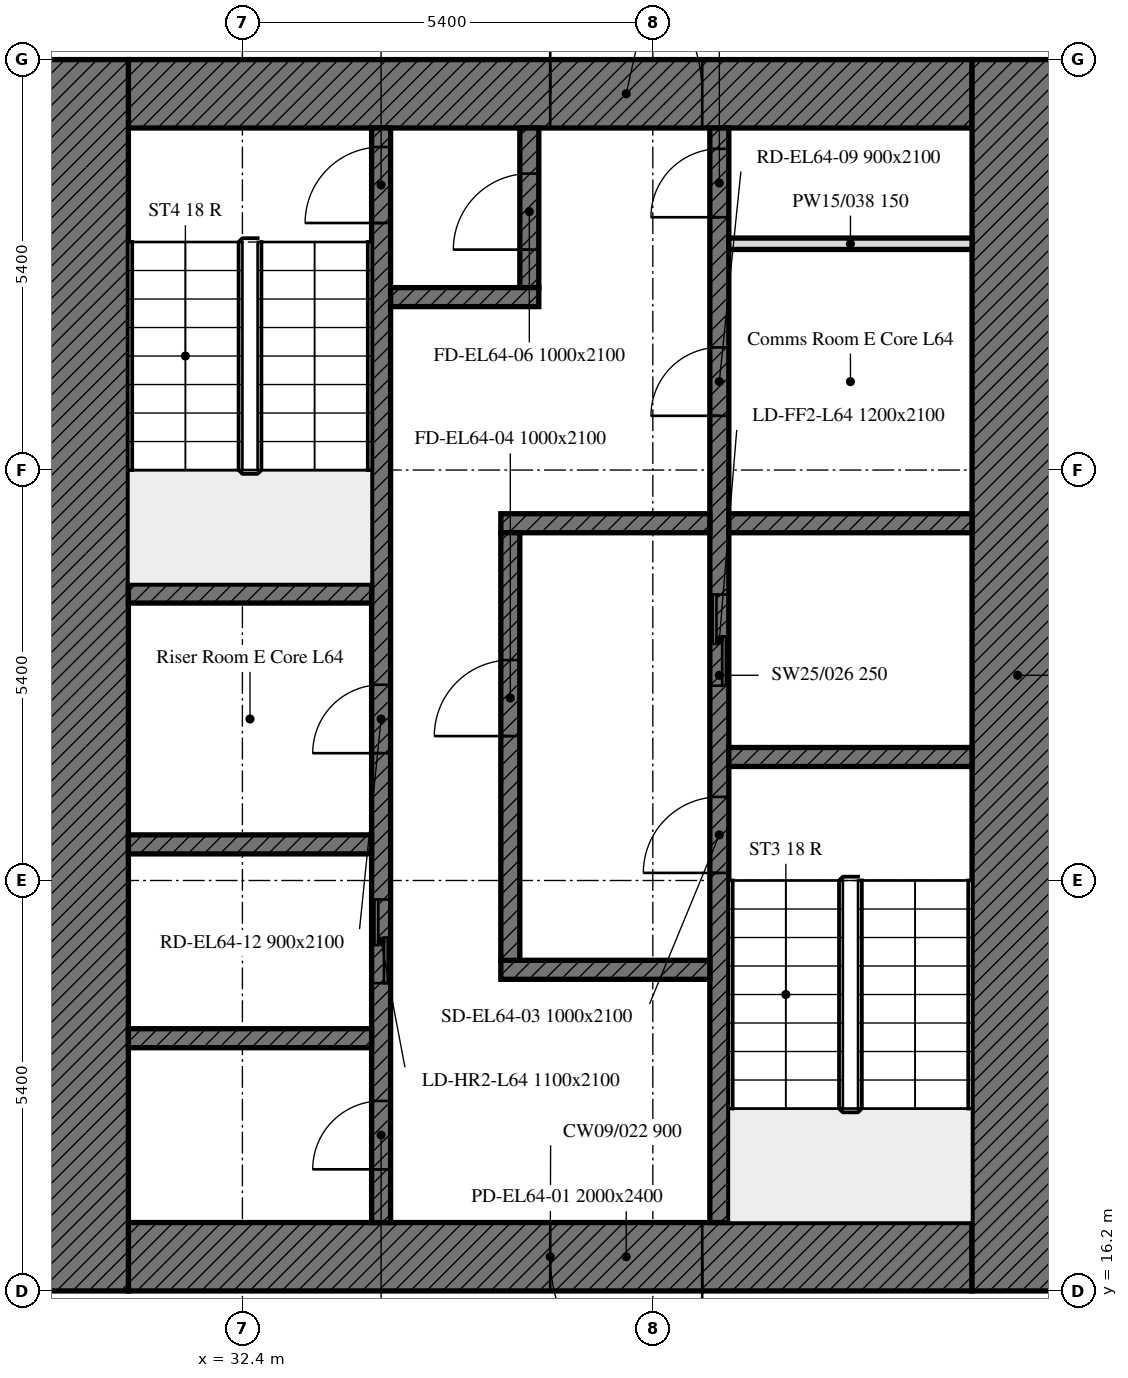
"""IFC4 building model, lengths in metres.
Left out: names, types, materials, properties, quantities, classifications, styles, units other than length and angle.
Written with IfcOpenShell. Run it as: python <this file> out.ifc"""

import sys

from ifc_helpers import new_model, si_unit, direction, frame, frame_2d, origin, place, context, subcontext, project, spatial, rectangle, extrude, element, fill, save


model = new_model("IFC4")
c1 = context("Model", 3, precision=1e-05, world=origin(), true_north=direction((0.0, 1.0)))
c2 = subcontext(c1, "Body", "Model", "MODEL_VIEW")
j1 = project(units=[si_unit("LENGTHUNIT", "METRE"), si_unit("PLANEANGLEUNIT", "RADIAN")], contexts=[c1])
p1 = place(None, origin())
s1 = spatial("IfcSite", under=j1, at=p1, CompositionType="ELEMENT")
p2 = place(p1, origin())
s2 = spatial("IfcBuilding", under=s1, at=p2, CompositionType="ELEMENT")
p3 = place(p2, frame((0.0, 0.0, 265.3)))
s3 = spatial("IfcBuildingStorey", under=s2, at=p3, CompositionType="ELEMENT", Elevation=265.3)
p4 = place(p3, frame((42.0, 16.65, 0.0), z_axis=(0.0, 0.0, 1.0), x_axis=(-1.0, 0.0, 0.0)))
e1 = element("IfcWall", 1, at=p4, inside=s3, PredefinedType="SOLIDWALL", context=c2, shape_type="SweptSolid", body=[
    extrude(rectangle(XDim=11.1, YDim=0.9, at=frame_2d((5.55, 0.0))), origin(), (0.0, 0.0, 1.0), 3.0),
])
p5 = place(p4, frame((3.55, 0.0, 0.0)))
e2 = element("IfcOpeningElement", 2, at=p5, cuts=e1, PredefinedType="OPENING", context=c2, shape_type="SweptSolid", body=[
    extrude(rectangle(XDim=2.0, YDim=2.4, at=frame_2d((1.0, 1.2))), frame((0.0, 0.45, 0.0), z_axis=(0.0, -1.0, 0.0), x_axis=(1.0, 0.0, 0.0)), (0.0, 0.0, 1.0), 0.9),
])
p6 = place(p3, frame((30.9, 31.95, 0.0), z_axis=(0.0, 0.0, 1.0), x_axis=(1.0, 0.0, 0.0)))
e3 = element("IfcWall", 3, at=p6, inside=s3, PredefinedType="SOLIDWALL", context=c2, shape_type="SweptSolid", body=[
    extrude(rectangle(XDim=11.1, YDim=0.9, at=frame_2d((5.55, 0.0))), origin(), (0.0, 0.0, 1.0), 3.0),
])
p7 = place(p6, frame((5.55, 0.0, 0.0)))
e4 = element("IfcOpeningElement", 4, at=p7, cuts=e3, PredefinedType="OPENING", context=c2, shape_type="SweptSolid", body=[
    extrude(rectangle(XDim=2.0, YDim=2.4, at=frame_2d((1.0, 1.2))), frame((0.0, 0.45, 0.0), z_axis=(0.0, -1.0, 0.0), x_axis=(1.0, 0.0, 0.0)), (0.0, 0.0, 1.0), 0.9),
])
for number, where, z_axis, x_axis in (
    (5, (42.6, 32.4, 0.0), (0.0, 0.0, 1.0), (0.0, -1.0, 0.0)),
    (6, (30.3, 16.2, 0.0), (0.0, 0.0, 1.0), (0.0, 1.0, 0.0)),
):
    element("IfcWall", number, at=place(p3, frame(where, z_axis=z_axis, x_axis=x_axis)), inside=s3, PredefinedType="SOLIDWALL", context=c2, shape_type="SweptSolid", body=[
        extrude(rectangle(XDim=16.2, YDim=1.2, at=frame_2d((8.1, 0.0))), origin(), (0.0, 0.0, 1.0), 3.0),
    ])
p8 = place(p3, frame((38.675, 17.1, 0.0), z_axis=(0.0, 0.0, 1.0), x_axis=(0.0, 1.0, 0.0)))
e7 = element("IfcWall", 7, at=p8, inside=s3, PredefinedType="SOLIDWALL", context=c2, shape_type="SweptSolid", body=[
    extrude(rectangle(XDim=14.4, YDim=0.25, at=frame_2d((7.2, 0.0))), origin(), (0.0, 0.0, 1.0), 3.0),
])
p9 = place(p8, frame((4.6, 0.0, 0.0)))
e8 = element("IfcOpeningElement", 8, at=p9, cuts=e7, PredefinedType="OPENING", context=c2, shape_type="SweptSolid", body=[
    extrude(rectangle(XDim=1.0, YDim=2.1, at=frame_2d((0.5, 1.05))), frame((0.0, 0.125, 0.0), z_axis=(0.0, -1.0, 0.0), x_axis=(1.0, 0.0, 0.0)), (0.0, 0.0, 1.0), 0.25),
])
p10 = place(p8, frame((7.062, 0.0, 0.0)))
e9 = element("IfcOpeningElement", 9, at=p10, cuts=e7, PredefinedType="OPENING", context=c2, shape_type="SweptSolid", body=[
    extrude(rectangle(XDim=1.2, YDim=2.1, at=frame_2d((0.6, 1.05))), frame((0.0, 0.125, 0.0), z_axis=(0.0, -1.0, 0.0), x_axis=(1.0, 0.0, 0.0)), (0.0, 0.0, 1.0), 0.25),
])
p11 = place(p8, frame((10.614, 0.0, 0.0)))
e10 = element("IfcOpeningElement", 10, at=p11, cuts=e7, PredefinedType="OPENING", context=c2, shape_type="SweptSolid", body=[
    extrude(rectangle(XDim=0.9, YDim=2.1, at=frame_2d((0.45, 1.05))), frame((0.0, 0.125, 0.0), z_axis=(0.0, -1.0, 0.0), x_axis=(1.0, 0.0, 0.0)), (0.0, 0.0, 1.0), 0.25),
])
p12 = place(p8, frame((13.226, 0.0, 0.0)))
e11 = element("IfcOpeningElement", 11, at=p12, cuts=e7, PredefinedType="OPENING", context=c2, shape_type="SweptSolid", body=[
    extrude(rectangle(XDim=0.9, YDim=2.1, at=frame_2d((0.45, 1.05))), frame((0.0, 0.125, 0.0), z_axis=(0.0, -1.0, 0.0), x_axis=(1.0, 0.0, 0.0)), (0.0, 0.0, 1.0), 0.25),
])
p13 = place(p3, frame((34.225, 17.1, 0.0), z_axis=(0.0, 0.0, 1.0), x_axis=(0.0, 1.0, 0.0)))
e12 = element("IfcWall", 12, at=p13, inside=s3, PredefinedType="SOLIDWALL", context=c2, shape_type="SweptSolid", body=[
    extrude(rectangle(XDim=14.4, YDim=0.25, at=frame_2d((7.2, 0.0))), origin(), (0.0, 0.0, 1.0), 3.0),
])
p14 = place(p13, frame((13.15, 0.0, 0.0)))
e13 = element("IfcOpeningElement", 13, at=p14, cuts=e12, PredefinedType="OPENING", context=c2, shape_type="SweptSolid", body=[
    extrude(rectangle(XDim=1.0, YDim=2.1, at=frame_2d((0.5, 1.05))), frame((0.0, 0.125, 0.0), z_axis=(0.0, -1.0, 0.0), x_axis=(1.0, 0.0, 0.0)), (0.0, 0.0, 1.0), 0.25),
])
p15 = place(p13, frame((3.15, 0.0, 0.0)))
e14 = element("IfcOpeningElement", 14, at=p15, cuts=e12, PredefinedType="OPENING", context=c2, shape_type="SweptSolid", body=[
    extrude(rectangle(XDim=1.1, YDim=2.1, at=frame_2d((0.55, 1.05))), frame((0.0, 0.125, 0.0), z_axis=(0.0, -1.0, 0.0), x_axis=(1.0, 0.0, 0.0)), (0.0, 0.0, 1.0), 0.25),
])
p16 = place(p13, frame((0.7, 0.0, 0.0)))
e15 = element("IfcOpeningElement", 15, at=p16, cuts=e12, PredefinedType="OPENING", context=c2, shape_type="SweptSolid", body=[
    extrude(rectangle(XDim=0.9, YDim=2.1, at=frame_2d((0.45, 1.05))), frame((0.0, 0.125, 0.0), z_axis=(0.0, -1.0, 0.0), x_axis=(1.0, 0.0, 0.0)), (0.0, 0.0, 1.0), 0.25),
])
p17 = place(p13, frame((6.175, 0.0, 0.0)))
e16 = element("IfcOpeningElement", 16, at=p17, cuts=e12, PredefinedType="OPENING", context=c2, shape_type="SweptSolid", body=[
    extrude(rectangle(XDim=0.9, YDim=2.1, at=frame_2d((0.45, 1.05))), frame((0.0, 0.125, 0.0), z_axis=(0.0, -1.0, 0.0), x_axis=(1.0, 0.0, 0.0)), (0.0, 0.0, 1.0), 0.25),
])
p18 = place(p3, frame((38.8, 23.225, 0.0), z_axis=(0.0, 0.0, 1.0), x_axis=(1.0, 0.0, 0.0)))
e17 = element("IfcWall", 17, at=p18, inside=s3, PredefinedType="SOLIDWALL", context=c2, shape_type="SweptSolid", body=[
    extrude(rectangle(XDim=3.2, YDim=0.25, at=frame_2d((1.6, 0.0))), origin(), (0.0, 0.0, 1.0), 3.0),
])
for number, where, z_axis, x_axis in (
    (18, (30.9, 25.375, 0.0), (0.0, 0.0, 1.0), (1.0, 0.0, 0.0)),
    (19, (30.9, 22.075, 0.0), (0.0, 0.0, 1.0), (1.0, 0.0, 0.0)),
):
    element("IfcWall", number, at=place(p3, frame(where, z_axis=z_axis, x_axis=x_axis)), inside=s3, PredefinedType="SOLIDWALL", context=c2, shape_type="SweptSolid", body=[
        extrude(rectangle(XDim=3.2, YDim=0.25, at=frame_2d((1.6, 0.0))), origin(), (0.0, 0.0, 1.0), 3.0),
    ])
p19 = place(p3, frame((38.8, 26.3, 0.0), z_axis=(0.0, 0.0, 1.0), x_axis=(1.0, 0.0, 0.0)))
e20 = element("IfcWall", 20, at=p19, inside=s3, PredefinedType="SOLIDWALL", context=c2, shape_type="SweptSolid", body=[
    extrude(rectangle(XDim=3.2, YDim=0.25, at=frame_2d((1.6, 0.0))), origin(), (0.0, 0.0, 1.0), 3.0),
])
for number, where, z_axis, x_axis in (
    (21, (35.8, 26.3, 0.0), (0.0, 0.0, 1.0), (1.0, 0.0, 0.0)),
    (22, (35.8, 20.425, 0.0), (0.0, 0.0, 1.0), (1.0, 0.0, 0.0)),
):
    element("IfcWall", number, at=place(p3, frame(where, z_axis=z_axis, x_axis=x_axis)), inside=s3, PredefinedType="SOLIDWALL", context=c2, shape_type="SweptSolid", body=[
        extrude(rectangle(XDim=2.75, YDim=0.25, at=frame_2d((1.375, 0.0))), origin(), (0.0, 0.0, 1.0), 3.0),
    ])
p20 = place(p3, frame((36.175, 29.4, 0.0), z_axis=(0.0, 0.0, 1.0), x_axis=(0.0, 1.0, 0.0)))
e23 = element("IfcWall", 23, at=p20, inside=s3, PredefinedType="SOLIDWALL", context=c2, shape_type="SweptSolid", body=[
    extrude(rectangle(XDim=2.1, YDim=0.25, at=frame_2d((1.05, 0.0))), origin(), (0.0, 0.0, 1.0), 3.0),
])
p21 = place(p20, frame((0.5, 0.0, 0.0)))
e24 = element("IfcOpeningElement", 24, at=p21, cuts=e23, PredefinedType="OPENING", context=c2, shape_type="SweptSolid", body=[
    extrude(rectangle(XDim=1.0, YDim=2.1, at=frame_2d((0.5, 1.05))), frame((0.0, 0.125, 0.0), z_axis=(0.0, -1.0, 0.0), x_axis=(1.0, 0.0, 0.0)), (0.0, 0.0, 1.0), 0.25),
])
p22 = place(p3, frame((34.35, 29.275, 0.0), z_axis=(0.0, 0.0, 1.0), x_axis=(1.0, 0.0, 0.0)))
e25 = element("IfcWall", 25, at=p22, inside=s3, PredefinedType="SOLIDWALL", context=c2, shape_type="SweptSolid", body=[
    extrude(rectangle(XDim=1.95, YDim=0.25, at=frame_2d((0.975, 0.0))), origin(), (0.0, 0.0, 1.0), 3.0),
])
p23 = place(p3, frame((35.925, 20.55, 0.0), z_axis=(0.0, 0.0, 1.0), x_axis=(0.0, 1.0, 0.0)))
e26 = element("IfcWall", 26, at=p23, inside=s3, PredefinedType="SOLIDWALL", context=c2, shape_type="SweptSolid", body=[
    extrude(rectangle(XDim=5.625, YDim=0.25, at=frame_2d((2.812, 0.0))), origin(), (0.0, 0.0, 1.0), 3.0),
])
p24 = place(p23, frame((2.95, 0.0, 0.0)))
e27 = element("IfcOpeningElement", 27, at=p24, cuts=e26, PredefinedType="OPENING", context=c2, shape_type="SweptSolid", body=[
    extrude(rectangle(XDim=1.0, YDim=2.1, at=frame_2d((0.5, 1.05))), frame((0.0, 0.125, 0.0), z_axis=(0.0, -1.0, 0.0), x_axis=(1.0, 0.0, 0.0)), (0.0, 0.0, 1.0), 0.25),
])
p25 = place(p3, frame((30.9, 19.525, 0.0), z_axis=(0.0, 0.0, 1.0), x_axis=(1.0, 0.0, 0.0)))
e28 = element("IfcWall", 28, at=p25, inside=s3, PredefinedType="SOLIDWALL", context=c2, shape_type="SweptSolid", body=[
    extrude(rectangle(XDim=3.2, YDim=0.25, at=frame_2d((1.6, 0.0))), origin(), (0.0, 0.0, 1.0), 3.0),
])
p26 = place(p3, frame((38.8, 29.977, 0.0), z_axis=(0.0, 0.0, 1.0), x_axis=(1.0, 0.0, 0.0)))
e29 = element("IfcWall", 29, at=p26, inside=s3, PredefinedType="PARTITIONING", context=c2, shape_type="SweptSolid", body=[
    extrude(rectangle(XDim=3.2, YDim=0.15, at=frame_2d((1.6, 0.0))), origin(), (0.0, 0.0, 1.0), 3.0),
])
p27 = place(p5, origin())
e30 = element("IfcDoor", 30, at=p27, inside=s3, OperationType="DOUBLE_DOOR_SINGLE_SWING", PredefinedType="DOOR", context=c2, shape_type="SweptSolid", body=[
    extrude(rectangle(XDim=2.0, YDim=2.4, at=frame_2d((1.0, 1.2))), frame((0.0, 0.025, 0.0), z_axis=(0.0, -1.0, 0.0), x_axis=(1.0, 0.0, 0.0)), (0.0, 0.0, 1.0), 0.05),
])
fill(e2, e30)
p28 = place(p7, origin())
e31 = element("IfcDoor", 31, at=p28, inside=s3, OperationType="DOUBLE_DOOR_SINGLE_SWING", PredefinedType="DOOR", context=c2, shape_type="SweptSolid", body=[
    extrude(rectangle(XDim=2.0, YDim=2.4, at=frame_2d((1.0, 1.2))), frame((0.0, 0.025, 0.0), z_axis=(0.0, -1.0, 0.0), x_axis=(1.0, 0.0, 0.0)), (0.0, 0.0, 1.0), 0.05),
])
fill(e4, e31)
p29 = place(p9, origin())
e32 = element("IfcDoor", 32, at=p29, inside=s3, OperationType="SINGLE_SWING_LEFT", PredefinedType="DOOR", context=c2, shape_type="SweptSolid", body=[
    extrude(rectangle(XDim=1.0, YDim=2.1, at=frame_2d((0.5, 1.05))), frame((0.0, 0.025, 0.0), z_axis=(0.0, -1.0, 0.0), x_axis=(1.0, 0.0, 0.0)), (0.0, 0.0, 1.0), 0.05),
])
fill(e8, e32)
p30 = place(p24, origin())
e33 = element("IfcDoor", 33, at=p30, inside=s3, OperationType="SINGLE_SWING_LEFT", PredefinedType="DOOR", context=c2, shape_type="SweptSolid", body=[
    extrude(rectangle(XDim=1.0, YDim=2.1, at=frame_2d((0.5, 1.05))), frame((0.0, 0.025, 0.0), z_axis=(0.0, -1.0, 0.0), x_axis=(1.0, 0.0, 0.0)), (0.0, 0.0, 1.0), 0.05),
])
fill(e27, e33)
p31 = place(p14, origin())
e34 = element("IfcDoor", 34, at=p31, inside=s3, OperationType="SINGLE_SWING_LEFT", PredefinedType="DOOR", context=c2, shape_type="SweptSolid", body=[
    extrude(rectangle(XDim=1.0, YDim=2.1, at=frame_2d((0.5, 1.05))), frame((0.0, 0.025, 0.0), z_axis=(0.0, -1.0, 0.0), x_axis=(1.0, 0.0, 0.0)), (0.0, 0.0, 1.0), 0.05),
])
fill(e13, e34)
p32 = place(p21, origin())
e35 = element("IfcDoor", 35, at=p32, inside=s3, OperationType="SINGLE_SWING_LEFT", PredefinedType="DOOR", context=c2, shape_type="SweptSolid", body=[
    extrude(rectangle(XDim=1.0, YDim=2.1, at=frame_2d((0.5, 1.05))), frame((0.0, 0.025, 0.0), z_axis=(0.0, -1.0, 0.0), x_axis=(1.0, 0.0, 0.0)), (0.0, 0.0, 1.0), 0.05),
])
fill(e24, e35)
p33 = place(p10, origin())
e36 = element("IfcDoor", 36, at=p33, inside=s3, OperationType="DOUBLE_DOOR_SLIDING", PredefinedType="DOOR", context=c2, shape_type="SweptSolid", body=[
    extrude(rectangle(XDim=1.2, YDim=2.1, at=frame_2d((0.6, 1.05))), frame((0.0, 0.025, 0.0), z_axis=(0.0, -1.0, 0.0), x_axis=(1.0, 0.0, 0.0)), (0.0, 0.0, 1.0), 0.05),
])
fill(e9, e36)
p34 = place(p15, origin())
e37 = element("IfcDoor", 37, at=p34, inside=s3, OperationType="DOUBLE_DOOR_SLIDING", PredefinedType="DOOR", context=c2, shape_type="SweptSolid", body=[
    extrude(rectangle(XDim=1.1, YDim=2.1, at=frame_2d((0.55, 1.05))), frame((0.0, 0.025, 0.0), z_axis=(0.0, -1.0, 0.0), x_axis=(1.0, 0.0, 0.0)), (0.0, 0.0, 1.0), 0.05),
])
fill(e14, e37)
p35 = place(p11, origin())
e38 = element("IfcDoor", 38, at=p35, inside=s3, OperationType="SINGLE_SWING_LEFT", PredefinedType="DOOR", context=c2, shape_type="SweptSolid", body=[
    extrude(rectangle(XDim=0.9, YDim=2.1, at=frame_2d((0.45, 1.05))), frame((0.0, 0.025, 0.0), z_axis=(0.0, -1.0, 0.0), x_axis=(1.0, 0.0, 0.0)), (0.0, 0.0, 1.0), 0.05),
])
fill(e10, e38)
p36 = place(p12, origin())
e39 = element("IfcDoor", 39, at=p36, inside=s3, OperationType="SINGLE_SWING_LEFT", PredefinedType="DOOR", context=c2, shape_type="SweptSolid", body=[
    extrude(rectangle(XDim=0.9, YDim=2.1, at=frame_2d((0.45, 1.05))), frame((0.0, 0.025, 0.0), z_axis=(0.0, -1.0, 0.0), x_axis=(1.0, 0.0, 0.0)), (0.0, 0.0, 1.0), 0.05),
])
fill(e11, e39)
p37 = place(p16, origin())
e40 = element("IfcDoor", 40, at=p37, inside=s3, OperationType="SINGLE_SWING_LEFT", PredefinedType="DOOR", context=c2, shape_type="SweptSolid", body=[
    extrude(rectangle(XDim=0.9, YDim=2.1, at=frame_2d((0.45, 1.05))), frame((0.0, 0.025, 0.0), z_axis=(0.0, -1.0, 0.0), x_axis=(1.0, 0.0, 0.0)), (0.0, 0.0, 1.0), 0.05),
])
fill(e15, e40)
p38 = place(p17, origin())
e41 = element("IfcDoor", 41, at=p38, inside=s3, OperationType="SINGLE_SWING_LEFT", PredefinedType="DOOR", context=c2, shape_type="SweptSolid", body=[
    extrude(rectangle(XDim=0.9, YDim=2.1, at=frame_2d((0.45, 1.05))), frame((0.0, 0.025, 0.0), z_axis=(0.0, -1.0, 0.0), x_axis=(1.0, 0.0, 0.0)), (0.0, 0.0, 1.0), 0.05),
])
fill(e16, e41)
save(model, sys.argv[1])
